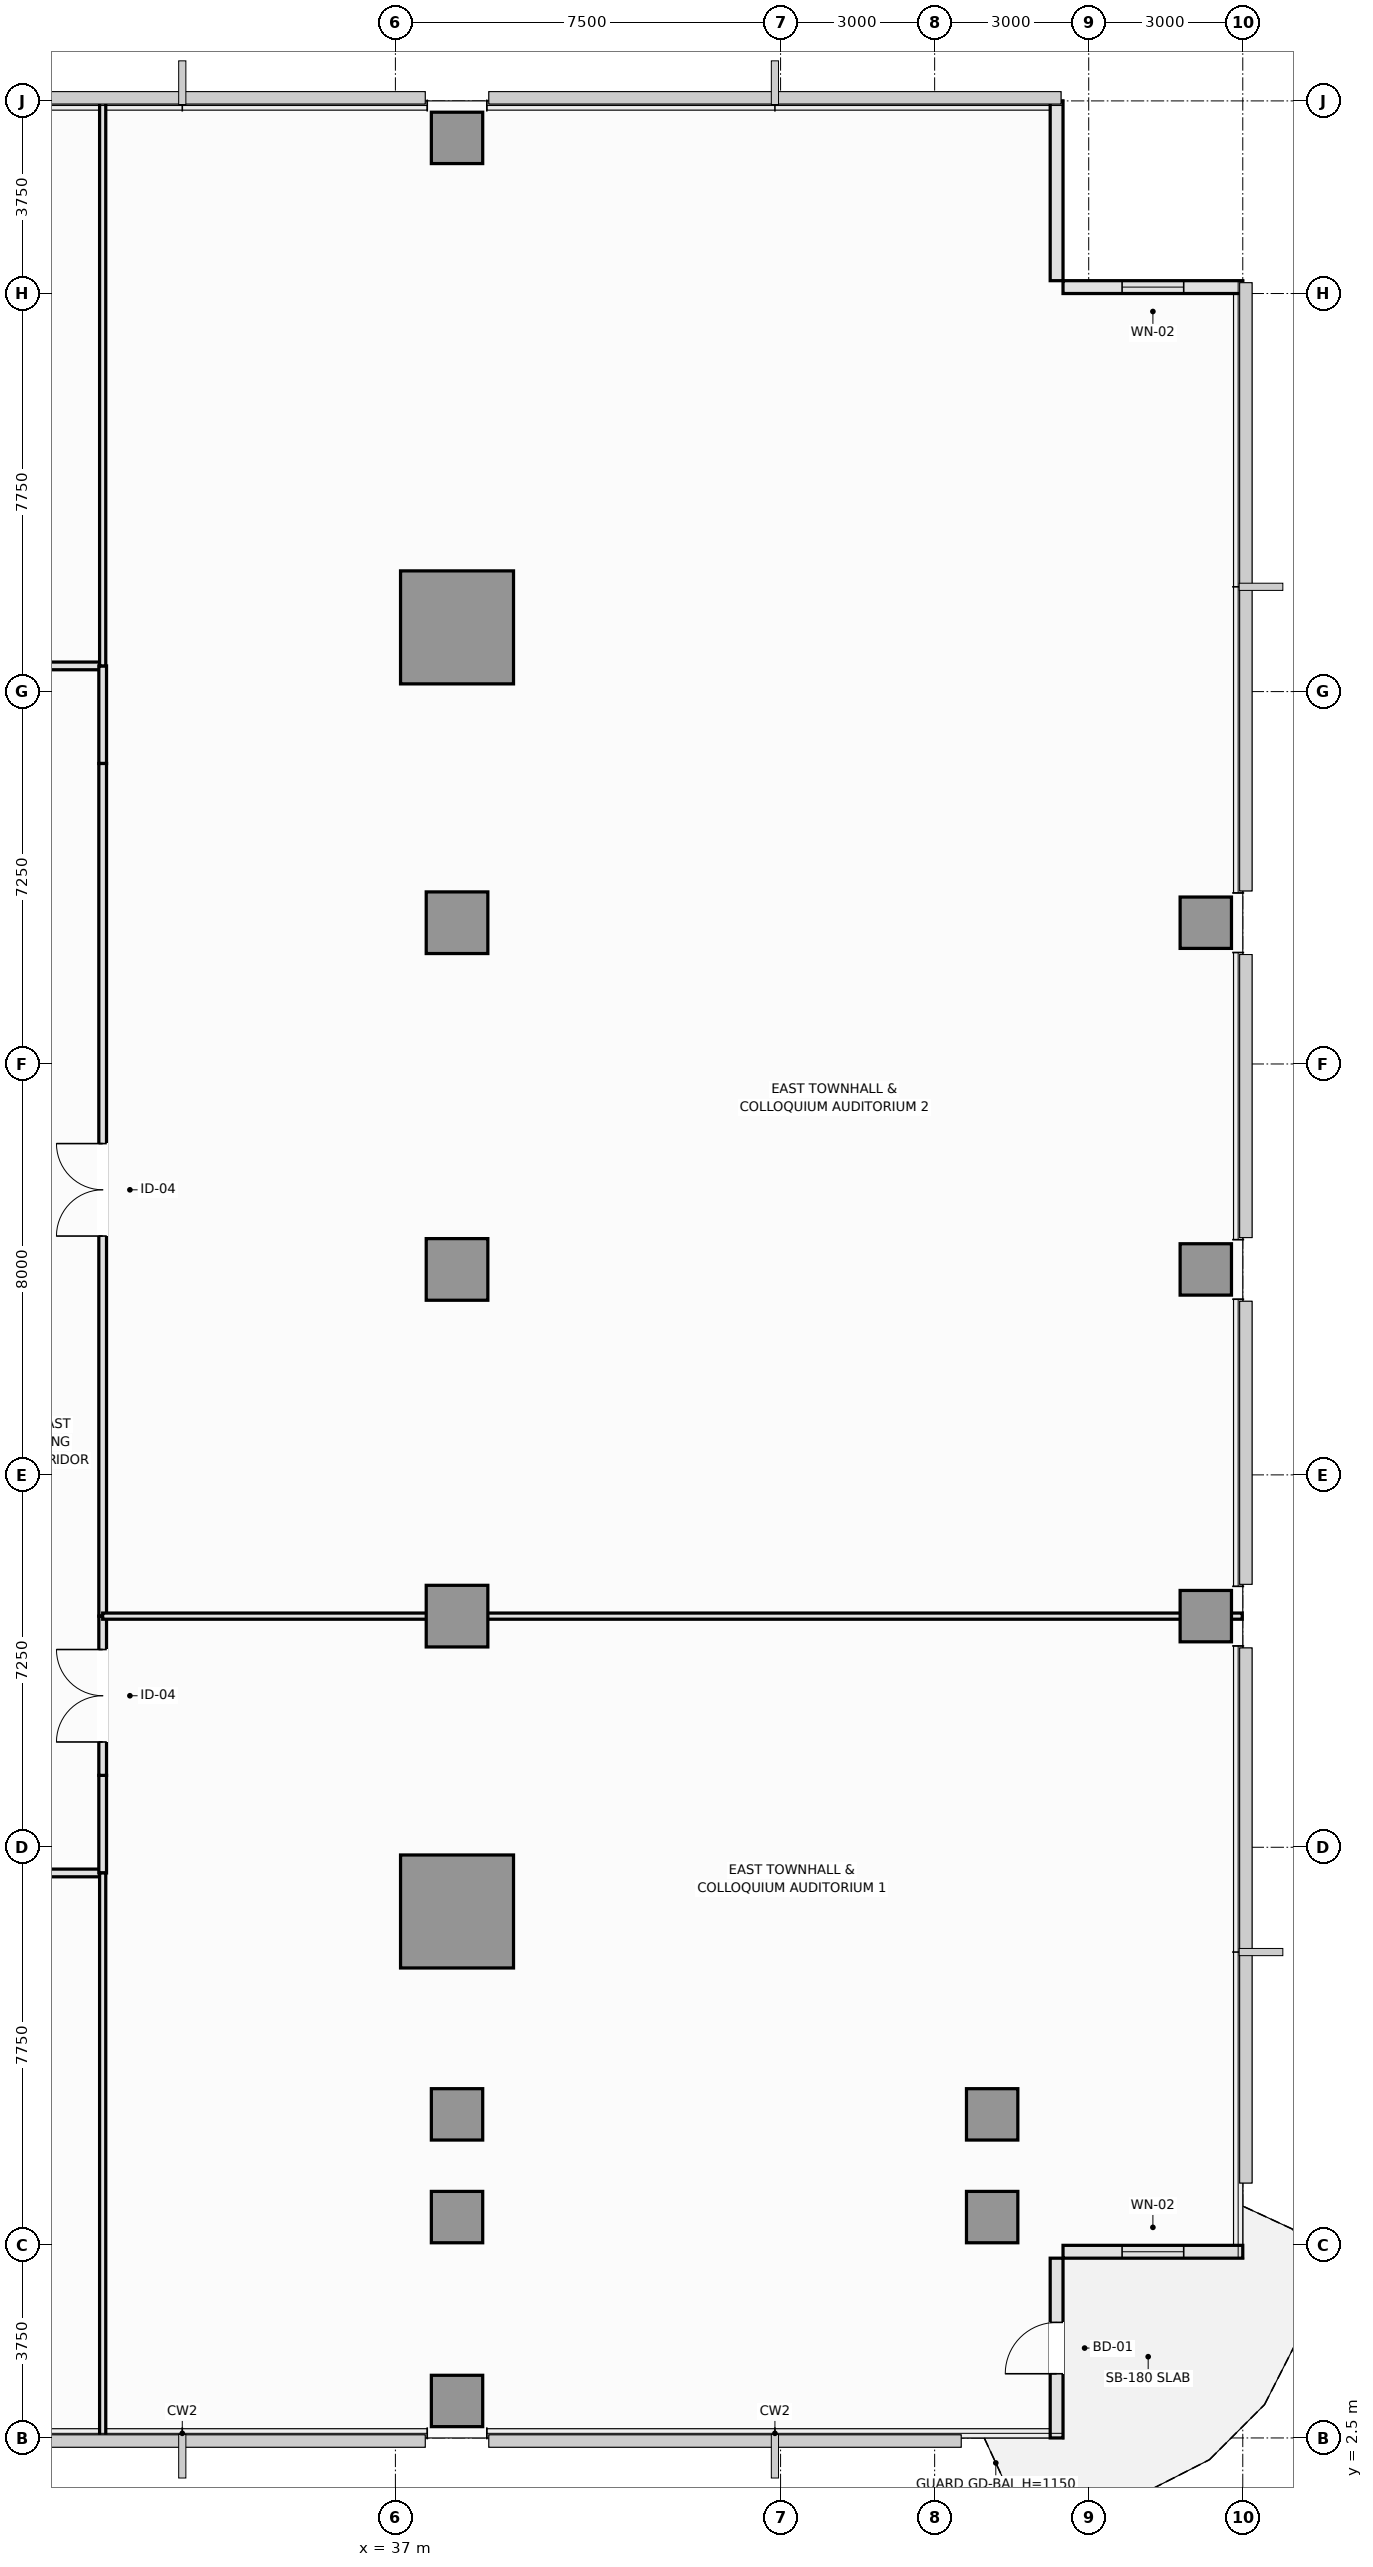
"""IFC4 building model, lengths in metres.
Left out: names, types, materials, properties, quantities, classifications, styles, units other than length and angle.
Written with IfcOpenShell. Run it as: python <this file> out.ifc"""

import sys

from ifc_helpers import new_model, si_unit, direction, frame, frame_2d, origin, origin_2d, place, context, subcontext, project, spatial, rectangle, extrude, element, fill, save


model = new_model("IFC4")
c1 = context("Model", 3, precision=1e-05, world=origin(), true_north=direction((0.0, 1.0)))
c2 = subcontext(c1, "Body", "Model", "MODEL_VIEW")
j1 = project(units=[si_unit("LENGTHUNIT", "METRE"), si_unit("PLANEANGLEUNIT", "RADIAN")], contexts=[c1])
p1 = place(None, origin())
s1 = spatial("IfcSite", under=j1, at=p1, CompositionType="ELEMENT")
p2 = place(p1, origin())
s2 = spatial("IfcBuilding", under=s1, at=p2, CompositionType="ELEMENT")
p3 = place(p2, frame((0.0, 0.0, 89.5)))
s3 = spatial("IfcBuildingStorey", under=s2, at=p3, CompositionType="ELEMENT", Elevation=89.5)
for number, where, z_axis, x_axis in (
    (1, (38.2, 12.75, 0.0), (0.0, 0.0, 1.0), (1.0, 0.0, 0.0)),
    (2, (38.2, 37.75, 0.0), (0.0, 0.0, 1.0), (1.0, 0.0, 0.0)),
):
    element("IfcColumn", number, at=place(p3, frame(where, z_axis=z_axis, x_axis=x_axis)), inside=s3, PredefinedType="COLUMN", context=c2, shape_type="SweptSolid", body=[
        extrude(rectangle(XDim=2.2, YDim=2.2, at=origin_2d()), origin(), (0.0, 0.0, 1.0), 3.55),
    ])
for number, where, z_axis, x_axis in (
    (3, (38.2, 18.5, 0.0), (0.0, 0.0, 1.0), (1.0, 0.0, 0.0)),
    (4, (38.2, 25.25, 0.0), (0.0, 0.0, 1.0), (1.0, 0.0, 0.0)),
    (5, (38.2, 32.0, 0.0), (0.0, 0.0, 1.0), (1.0, 0.0, 0.0)),
):
    element("IfcColumn", number, at=place(p3, frame(where, z_axis=z_axis, x_axis=x_axis)), inside=s3, PredefinedType="COLUMN", context=c2, shape_type="SweptSolid", body=[
        extrude(rectangle(XDim=1.2, YDim=1.2, at=origin_2d()), origin(), (0.0, 0.0, 1.0), 3.55),
    ])
for number, where, z_axis, x_axis in (
    (6, (48.62, 6.8, 0.0), (0.0, 0.0, 1.0), (1.0, 0.0, 0.0)),
    (7, (38.2, 6.8, 0.0), (0.0, 0.0, 1.0), (1.0, 0.0, 0.0)),
    (8, (38.2, 8.8, 0.0), (0.0, 0.0, 1.0), (1.0, 0.0, 0.0)),
    (9, (48.62, 8.8, 0.0), (0.0, 0.0, 1.0), (1.0, 0.0, 0.0)),
    (10, (52.78, 18.5, 0.0), (0.0, 0.0, 1.0), (1.0, 0.0, 0.0)),
    (11, (52.78, 25.25, 0.0), (0.0, 0.0, 1.0), (1.0, 0.0, 0.0)),
    (12, (52.78, 32.0, 0.0), (0.0, 0.0, 1.0), (1.0, 0.0, 0.0)),
    (13, (38.2, 3.22, 0.0), (0.0, 0.0, 1.0), (1.0, 0.0, 0.0)),
    (14, (38.2, 47.28, 0.0), (0.0, 0.0, 1.0), (1.0, 0.0, 0.0)),
):
    element("IfcColumn", number, at=place(p3, frame(where, z_axis=z_axis, x_axis=x_axis)), inside=s3, PredefinedType="COLUMN", context=c2, shape_type="SweptSolid", body=[
        extrude(rectangle(XDim=1.0, YDim=1.0, at=origin_2d()), origin(), (0.0, 0.0, 1.0), 3.55),
    ])
p4 = place(p3, frame((49.875, 2.5, 0.0), z_axis=(0.0, 0.0, 1.0), x_axis=(0.0, 1.0, 0.0)))
e15 = element("IfcWall", 15, at=p4, inside=s3, PredefinedType="SOLIDWALL", context=c2, shape_type="SweptSolid", body=[
    extrude(rectangle(XDim=3.5, YDim=0.25, at=frame_2d((1.75, 0.0))), origin(), (0.0, 0.0, 1.0), 3.35),
])
p5 = place(p4, frame((1.25, 0.0, 0.0)))
e16 = element("IfcOpeningElement", 16, at=p5, cuts=e15, PredefinedType="OPENING", context=c2, shape_type="SweptSolid", body=[
    extrude(rectangle(XDim=1.0, YDim=2.2, at=frame_2d((0.5, 1.1))), frame((0.0, 0.135, 0.0), z_axis=(0.0, -1.0, 0.0), x_axis=(1.0, 0.0, 0.0)), (0.0, 0.0, 1.0), 0.27),
])
p6 = place(p3, frame((50.0, 6.125, 0.0), z_axis=(0.0, 0.0, 1.0), x_axis=(1.0, 0.0, 0.0)))
e17 = element("IfcWall", 17, at=p6, inside=s3, PredefinedType="SOLIDWALL", context=c2, shape_type="SweptSolid", body=[
    extrude(rectangle(XDim=3.5, YDim=0.25, at=frame_2d((1.75, 0.0))), origin(), (0.0, 0.0, 1.0), 3.35),
])
p7 = place(p6, frame((1.15, 0.0, 0.9)))
e18 = element("IfcOpeningElement", 18, at=p7, cuts=e17, PredefinedType="OPENING", context=c2, shape_type="SweptSolid", body=[
    extrude(rectangle(XDim=1.2, YDim=1.8, at=frame_2d((0.6, 0.9))), frame((0.0, 0.135, 0.0), z_axis=(0.0, -1.0, 0.0), x_axis=(1.0, 0.0, 0.0)), (0.0, 0.0, 1.0), 0.27),
])
p8 = place(p3, frame((53.5, 44.375, 0.0), z_axis=(0.0, 0.0, 1.0), x_axis=(-1.0, 0.0, 0.0)))
e19 = element("IfcWall", 19, at=p8, inside=s3, PredefinedType="SOLIDWALL", context=c2, shape_type="SweptSolid", body=[
    extrude(rectangle(XDim=3.5, YDim=0.25, at=frame_2d((1.75, 0.0))), origin(), (0.0, 0.0, 1.0), 3.35),
])
p9 = place(p8, frame((1.15, 0.0, 0.9)))
e20 = element("IfcOpeningElement", 20, at=p9, cuts=e19, PredefinedType="OPENING", context=c2, shape_type="SweptSolid", body=[
    extrude(rectangle(XDim=1.2, YDim=1.8, at=frame_2d((0.6, 0.9))), frame((0.0, 0.135, 0.0), z_axis=(0.0, -1.0, 0.0), x_axis=(1.0, 0.0, 0.0)), (0.0, 0.0, 1.0), 0.27),
])
p10 = place(p3, frame((49.875, 44.5, 0.0), z_axis=(0.0, 0.0, 1.0), x_axis=(0.0, 1.0, 0.0)))
e21 = element("IfcWall", 21, at=p10, inside=s3, PredefinedType="SOLIDWALL", context=c2, shape_type="SweptSolid", body=[
    extrude(rectangle(XDim=3.5, YDim=0.25, at=frame_2d((1.75, 0.0))), origin(), (0.0, 0.0, 1.0), 3.35),
])
p11 = place(p3, frame((27.5, 13.5, 0.0), z_axis=(0.0, 0.0, 1.0), x_axis=(1.0, 0.0, 0.0)))
e22 = element("IfcWall", 22, at=p11, inside=s3, PredefinedType="PARTITIONING", context=c2, shape_type="SweptSolid", body=[
    extrude(rectangle(XDim=3.8, YDim=0.15, at=frame_2d((1.9, 0.0))), origin(), (0.0, 0.0, 1.0), 3.35),
])
p12 = place(p11, frame((1.4, 0.0, 0.0)))
e23 = element("IfcOpeningElement", 23, at=p12, cuts=e22, PredefinedType="OPENING", context=c2, shape_type="SweptSolid", body=[
    extrude(rectangle(XDim=1.0, YDim=2.15, at=frame_2d((0.5, 1.075))), frame((0.0, 0.085, 0.0), z_axis=(0.0, -1.0, 0.0), x_axis=(1.0, 0.0, 0.0)), (0.0, 0.0, 1.0), 0.17),
])
p13 = place(p3, frame((31.3, 13.5, 0.0), z_axis=(0.0, 0.0, 1.0), x_axis=(0.0, 1.0, 0.0)))
e24 = element("IfcWall", 24, at=p13, inside=s3, PredefinedType="PARTITIONING", context=c2, shape_type="SweptSolid", body=[
    extrude(rectangle(XDim=1.9, YDim=0.15, at=frame_2d((0.95, 0.0))), origin(), (0.0, 0.0, 1.0), 3.35),
])
p14 = place(p3, frame((22.55, 37.0, 0.0), z_axis=(0.0, 0.0, 1.0), x_axis=(1.0, 0.0, 0.0)))
e25 = element("IfcWall", 25, at=p14, inside=s3, PredefinedType="PARTITIONING", context=c2, shape_type="SweptSolid", body=[
    extrude(rectangle(XDim=8.75, YDim=0.15, at=frame_2d((4.375, 0.0))), origin(), (0.0, 0.0, 1.0), 3.35),
])
p15 = place(p14, frame((2.988, 0.0, 0.0)))
e26 = element("IfcOpeningElement", 26, at=p15, cuts=e25, PredefinedType="OPENING", context=c2, shape_type="SweptSolid", body=[
    extrude(rectangle(XDim=1.0, YDim=2.15, at=frame_2d((0.5, 1.075))), frame((0.0, 0.085, 0.0), z_axis=(0.0, -1.0, 0.0), x_axis=(1.0, 0.0, 0.0)), (0.0, 0.0, 1.0), 0.17),
])
p16 = place(p3, frame((31.3, 35.1, 0.0), z_axis=(0.0, 0.0, 1.0), x_axis=(0.0, 1.0, 0.0)))
e27 = element("IfcWall", 27, at=p16, inside=s3, PredefinedType="PARTITIONING", context=c2, shape_type="SweptSolid", body=[
    extrude(rectangle(XDim=1.9, YDim=0.15, at=frame_2d((0.95, 0.0))), origin(), (0.0, 0.0, 1.0), 3.35),
])
p17 = place(p3, frame((31.3, 15.4, 0.0), z_axis=(0.0, 0.0, 1.0), x_axis=(0.0, 1.0, 0.0)))
e28 = element("IfcWall", 28, at=p17, inside=s3, PredefinedType="PARTITIONING", context=c2, shape_type="SweptSolid", body=[
    extrude(rectangle(XDim=3.1, YDim=0.15, at=frame_2d((1.55, 0.0))), origin(), (0.0, 0.0, 1.0), 3.35),
])
p18 = place(p17, frame((0.65, 0.0, 0.0)))
e29 = element("IfcOpeningElement", 29, at=p18, cuts=e28, PredefinedType="OPENING", context=c2, shape_type="SweptSolid", body=[
    extrude(rectangle(XDim=1.8, YDim=2.2, at=frame_2d((0.9, 1.1))), frame((0.0, 0.085, 0.0), z_axis=(0.0, -1.0, 0.0), x_axis=(1.0, 0.0, 0.0)), (0.0, 0.0, 1.0), 0.17),
])
p19 = place(p3, frame((31.3, 18.5, 0.0), z_axis=(0.0, 0.0, 1.0), x_axis=(0.0, 1.0, 0.0)))
e30 = element("IfcWall", 30, at=p19, inside=s3, PredefinedType="PARTITIONING", context=c2, shape_type="SweptSolid", body=[
    extrude(rectangle(XDim=16.6, YDim=0.15, at=frame_2d((8.3, 0.0))), origin(), (0.0, 0.0, 1.0), 3.35),
])
p20 = place(p19, frame((7.4, 0.0, 0.0)))
e31 = element("IfcOpeningElement", 31, at=p20, cuts=e30, PredefinedType="OPENING", context=c2, shape_type="SweptSolid", body=[
    extrude(rectangle(XDim=1.8, YDim=2.2, at=frame_2d((0.9, 1.1))), frame((0.0, 0.085, 0.0), z_axis=(0.0, -1.0, 0.0), x_axis=(1.0, 0.0, 0.0)), (0.0, 0.0, 1.0), 0.17),
])
for number, where, z_axis, x_axis in (
    (32, (31.3, 2.51, 0.0), (0.0, 0.0, 1.0), (0.0, 1.0, 0.0)),
    (33, (31.3, 37.0, 0.0), (0.0, 0.0, 1.0), (0.0, 1.0, 0.0)),
):
    element("IfcWall", number, at=place(p3, frame(where, z_axis=z_axis, x_axis=x_axis)), inside=s3, PredefinedType="PARTITIONING", context=c2, shape_type="SweptSolid", body=[
        extrude(rectangle(XDim=10.99, YDim=0.12, at=frame_2d((5.495, 0.0))), origin(), (0.0, 0.0, 1.0), 3.35),
    ])
p21 = place(p3, frame((31.3, 18.5, 0.0), z_axis=(0.0, 0.0, 1.0), x_axis=(1.0, 0.0, 0.0)))
e34 = element("IfcWall", 34, at=p21, inside=s3, PredefinedType="PARTITIONING", context=c2, shape_type="SweptSolid", body=[
    extrude(rectangle(XDim=22.19, YDim=0.12, at=frame_2d((11.095, 0.0))), origin(), (0.0, 0.0, 1.0), 2.7),
])
p22 = place(p5, frame((1.0, 0.0, 0.0), z_axis=(0.0, 0.0, 1.0), x_axis=(-1.0, 0.0, 0.0)))
e35 = element("IfcDoor", 35, at=p22, inside=s3, OperationType="SINGLE_SWING_LEFT", PredefinedType="DOOR", context=c2, shape_type="SweptSolid", body=[
    extrude(rectangle(XDim=1.0, YDim=2.2, at=frame_2d((0.5, 1.1))), frame((0.0, 0.025, 0.0), z_axis=(0.0, -1.0, 0.0), x_axis=(1.0, 0.0, 0.0)), (0.0, 0.0, 1.0), 0.05),
])
fill(e16, e35)
p23 = place(p7, origin())
e36 = element("IfcWindow", 36, at=p23, inside=s3, PartitioningType="SINGLE_PANEL", PredefinedType="WINDOW", context=c2, shape_type="SweptSolid", body=[
    extrude(rectangle(XDim=1.2, YDim=1.8, at=frame_2d((0.6, 0.9))), frame((0.0, 0.03, 0.0), z_axis=(0.0, -1.0, 0.0), x_axis=(1.0, 0.0, 0.0)), (0.0, 0.0, 1.0), 0.06),
])
fill(e18, e36)
p24 = place(p9, origin())
e37 = element("IfcWindow", 37, at=p24, inside=s3, PartitioningType="SINGLE_PANEL", PredefinedType="WINDOW", context=c2, shape_type="SweptSolid", body=[
    extrude(rectangle(XDim=1.2, YDim=1.8, at=frame_2d((0.6, 0.9))), frame((0.0, 0.03, 0.0), z_axis=(0.0, -1.0, 0.0), x_axis=(1.0, 0.0, 0.0)), (0.0, 0.0, 1.0), 0.06),
])
fill(e20, e37)
p25 = place(p18, origin())
e38 = element("IfcDoor", 38, at=p25, inside=s3, OperationType="DOUBLE_DOOR_SINGLE_SWING", PredefinedType="DOOR", context=c2, shape_type="SweptSolid", body=[
    extrude(rectangle(XDim=1.8, YDim=2.2, at=frame_2d((0.9, 1.1))), frame((0.0, 0.025, 0.0), z_axis=(0.0, -1.0, 0.0), x_axis=(1.0, 0.0, 0.0)), (0.0, 0.0, 1.0), 0.05),
])
fill(e29, e38)
p26 = place(p20, origin())
e39 = element("IfcDoor", 39, at=p26, inside=s3, OperationType="DOUBLE_DOOR_SINGLE_SWING", PredefinedType="DOOR", context=c2, shape_type="SweptSolid", body=[
    extrude(rectangle(XDim=1.8, YDim=2.2, at=frame_2d((0.9, 1.1))), frame((0.0, 0.025, 0.0), z_axis=(0.0, -1.0, 0.0), x_axis=(1.0, 0.0, 0.0)), (0.0, 0.0, 1.0), 0.05),
])
fill(e31, e39)
save(model, sys.argv[1])
